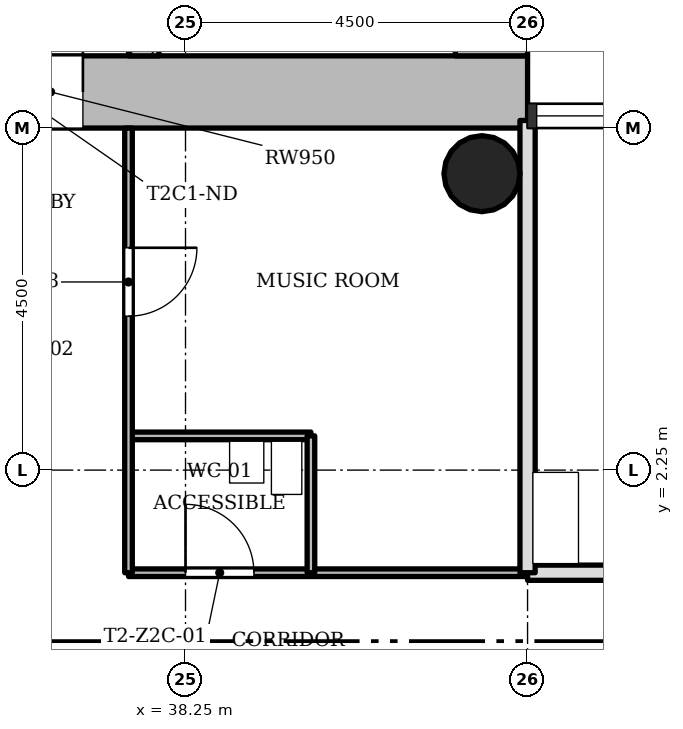
"""IFC4 building model, lengths in metres.
Left out: names, types, materials, properties, quantities, classifications, styles, units other than length and angle.
Written with IfcOpenShell. Run it as: python <this file> out.ifc"""

import sys

from ifc_helpers import new_model, si_unit, direction, frame, frame_2d, origin, origin_2d, place, context, subcontext, project, spatial, rectangle, hollow_circle, extrude, element, fill, save


model = new_model("IFC4")
c1 = context("Model", 3, precision=1e-05, world=origin(), true_north=direction((0.0, 1.0)))
c2 = subcontext(c1, "Body", "Model", "MODEL_VIEW")
j1 = project(units=[si_unit("LENGTHUNIT", "METRE"), si_unit("PLANEANGLEUNIT", "RADIAN")], contexts=[c1])
p1 = place(None, origin())
s1 = spatial("IfcSite", under=j1, at=p1, CompositionType="ELEMENT")
p2 = place(p1, origin())
s2 = spatial("IfcBuilding", under=s1, at=p2, CompositionType="ELEMENT")
p3 = place(p2, frame((0.0, 0.0, 86.8)))
s3 = spatial("IfcBuildingStorey", under=s2, at=p3, CompositionType="ELEMENT", Elevation=86.8)
p4 = place(p3, frame((30.2, 7.225, 0.0), z_axis=(0.0, 0.0, 1.0), x_axis=(1.0, 0.0, 0.0)))
e1 = element("IfcWall", 1, at=p4, inside=s3, PredefinedType="SHEAR", context=c2, shape_type="SweptSolid", body=[
    extrude(rectangle(XDim=12.55, YDim=0.95, at=frame_2d((6.275, 0.0))), origin(), (0.0, 0.0, 1.0), 3.4),
])
p5 = place(p4, frame((4.9, 0.0, 0.0)))
e2 = element("IfcOpeningElement", 2, at=p5, cuts=e1, PredefinedType="OPENING", context=c2, shape_type="SweptSolid", body=[
    extrude(rectangle(XDim=1.8, YDim=2.1, at=frame_2d((0.9, 1.05))), frame((0.0, 0.485, 0.0), z_axis=(0.0, -1.0, 0.0), x_axis=(1.0, 0.0, 0.0)), (0.0, 0.0, 1.0), 0.97),
])
p6 = place(p3, frame((42.275, 7.7, 0.0), z_axis=(0.0, 0.0, 1.0), x_axis=(0.0, 1.0, 0.0)))
e3 = element("IfcWall", 3, at=p6, inside=s3, PredefinedType="SHEAR", context=c2, shape_type="SweptSolid", body=[
    extrude(rectangle(XDim=8.05, YDim=0.95, at=frame_2d((4.025, 0.0))), origin(), (0.0, 0.0, 1.0), 3.4),
])
p7 = place(p3, frame((37.7, 7.7, 0.0), z_axis=(0.0, 0.0, 1.0), x_axis=(0.0, 1.0, 0.0)))
e4 = element("IfcWall", 4, at=p7, inside=s3, PredefinedType="SHEAR", context=c2, shape_type="SweptSolid", body=[
    extrude(rectangle(XDim=7.1, YDim=0.4, at=frame_2d((3.55, 0.0))), origin(), (0.0, 0.0, 1.0), 3.4),
])
p8 = place(p7, frame((0.8, 0.0, 0.0)))
e5 = element("IfcOpeningElement", 5, at=p8, cuts=e4, PredefinedType="OPENING", context=c2, shape_type="SweptSolid", body=[
    extrude(rectangle(XDim=1.1, YDim=2.1, at=frame_2d((0.55, 1.05))), frame((0.0, 0.21, 0.0), z_axis=(0.0, -1.0, 0.0), x_axis=(1.0, 0.0, 0.0)), (0.0, 0.0, 1.0), 0.42),
])
p9 = place(p7, frame((3.0, 0.0, 0.0)))
e6 = element("IfcOpeningElement", 6, at=p9, cuts=e4, PredefinedType="OPENING", context=c2, shape_type="SweptSolid", body=[
    extrude(rectangle(XDim=1.1, YDim=2.1, at=frame_2d((0.55, 1.05))), frame((0.0, 0.21, 0.0), z_axis=(0.0, -1.0, 0.0), x_axis=(1.0, 0.0, 0.0)), (0.0, 0.0, 1.0), 0.42),
])
p10 = place(p7, frame((5.2, 0.0, 0.0)))
e7 = element("IfcOpeningElement", 7, at=p10, cuts=e4, PredefinedType="OPENING", context=c2, shape_type="SweptSolid", body=[
    extrude(rectangle(XDim=1.1, YDim=2.1, at=frame_2d((0.55, 1.05))), frame((0.0, 0.21, 0.0), z_axis=(0.0, -1.0, 0.0), x_axis=(1.0, 0.0, 0.0)), (0.0, 0.0, 1.0), 0.42),
])
p11 = place(p3, frame((42.15, 6.15, 0.0), z_axis=(0.0, 0.0, 1.0), x_axis=(1.0, 0.0, 0.0)))
e8 = element("IfcColumn", 8, at=p11, inside=s3, PredefinedType="COLUMN", context=c2, shape_type="SweptSolid", body=[
    extrude(hollow_circle(Radius=0.5, WallThickness=0.036, at=origin_2d()), origin(), (0.0, 0.0, 1.0), 3.4),
])
p12 = place(p3, frame((42.75, 0.9, 0.0), z_axis=(0.0, 0.0, 1.0), x_axis=(-1.0, 0.0, 0.0)))
e9 = element("IfcWall", 9, at=p12, inside=s3, PredefinedType="PARTITIONING", context=c2, shape_type="SweptSolid", body=[
    extrude(rectangle(XDim=5.25, YDim=0.1, at=frame_2d((2.625, 0.0))), origin(), (0.0, 0.0, 1.0), 3.0),
])
p13 = place(p12, frame((3.6, 0.0, 0.0)))
e10 = element("IfcOpeningElement", 10, at=p13, cuts=e9, PredefinedType="OPENING", context=c2, shape_type="SweptSolid", body=[
    extrude(rectangle(XDim=0.9, YDim=2.1, at=frame_2d((0.45, 1.05))), frame((0.0, 0.06, 0.0), z_axis=(0.0, -1.0, 0.0), x_axis=(1.0, 0.0, 0.0)), (0.0, 0.0, 1.0), 0.12),
])
p14 = place(p3, frame((51.75, 0.9, 0.0), z_axis=(0.0, 0.0, 1.0), x_axis=(-1.0, 0.0, 0.0)))
e11 = element("IfcWall", 11, at=p14, inside=s3, PredefinedType="SOLIDWALL", context=c2, shape_type="SweptSolid", body=[
    extrude(rectangle(XDim=9.0, YDim=0.2, at=frame_2d((4.5, 0.0))), origin(), (0.0, 0.0, 1.0), 3.0),
])
p15 = place(p14, frame((1.95, 0.0, 0.0)))
e12 = element("IfcOpeningElement", 12, at=p15, cuts=e11, PredefinedType="OPENING", context=c2, shape_type="SweptSolid", body=[
    extrude(rectangle(XDim=0.9, YDim=2.1, at=frame_2d((0.45, 1.05))), frame((0.0, 0.11, 0.0), z_axis=(0.0, -1.0, 0.0), x_axis=(1.0, 0.0, 0.0)), (0.0, 0.0, 1.0), 0.22),
])
p16 = place(p3, frame((39.9, 2.7, 0.0), z_axis=(0.0, 0.0, 1.0), x_axis=(-1.0, 0.0, 0.0)))
e13 = element("IfcWall", 13, at=p16, inside=s3, PredefinedType="PARTITIONING", context=c2, shape_type="SweptSolid", body=[
    extrude(rectangle(XDim=2.4, YDim=0.1, at=frame_2d((1.2, 0.0))), origin(), (0.0, 0.0, 1.0), 3.0),
])
p17 = place(p3, frame((42.75, 0.9, 0.0), z_axis=(0.0, 0.0, 1.0), x_axis=(0.0, 1.0, 0.0)))
e14 = element("IfcWall", 14, at=p17, inside=s3, PredefinedType="SOLIDWALL", context=c2, shape_type="SweptSolid", body=[
    extrude(rectangle(XDim=5.95, YDim=0.2, at=frame_2d((2.975, 0.0))), origin(), (0.0, 0.0, 1.0), 3.0),
])
p18 = place(p3, frame((39.9, 0.9, 0.0), z_axis=(0.0, 0.0, 1.0), x_axis=(0.0, 1.0, 0.0)))
e15 = element("IfcWall", 15, at=p18, inside=s3, PredefinedType="PARTITIONING", context=c2, shape_type="SweptSolid", body=[
    extrude(rectangle(XDim=1.8, YDim=0.1, at=frame_2d((0.9, 0.0))), origin(), (0.0, 0.0, 1.0), 3.0),
])
p19 = place(p3, frame((37.5, 0.9, 0.0), z_axis=(0.0, 0.0, 1.0), x_axis=(0.0, 1.0, 0.0)))
e16 = element("IfcWall", 16, at=p19, inside=s3, PredefinedType="PARTITIONING", context=c2, shape_type="SweptSolid", body=[
    extrude(rectangle(XDim=5.85, YDim=0.1, at=frame_2d((2.925, 0.0))), origin(), (0.0, 0.0, 1.0), 3.0),
])
p20 = place(p19, frame((3.375, 0.0, 0.0)))
e17 = element("IfcOpeningElement", 17, at=p20, cuts=e16, PredefinedType="OPENING", context=c2, shape_type="SweptSolid", body=[
    extrude(rectangle(XDim=0.9, YDim=2.1, at=frame_2d((0.45, 1.05))), frame((0.0, 0.06, 0.0), z_axis=(0.0, -1.0, 0.0), x_axis=(1.0, 0.0, 0.0)), (0.0, 0.0, 1.0), 0.12),
])
p21 = place(p13, origin())
e18 = element("IfcDoor", 18, at=p21, inside=s3, OperationType="SINGLE_SWING_RIGHT", PredefinedType="DOOR", context=c2, shape_type="SweptSolid", body=[
    extrude(rectangle(XDim=0.9, YDim=2.1, at=frame_2d((0.45, 1.05))), frame((0.0, 0.025, 0.0), z_axis=(0.0, -1.0, 0.0), x_axis=(1.0, 0.0, 0.0)), (0.0, 0.0, 1.0), 0.05),
])
fill(e10, e18)
p22 = place(p20, origin())
e19 = element("IfcDoor", 19, at=p22, inside=s3, OperationType="SINGLE_SWING_RIGHT", PredefinedType="DOOR", context=c2, shape_type="SweptSolid", body=[
    extrude(rectangle(XDim=0.9, YDim=2.1, at=frame_2d((0.45, 1.05))), frame((0.0, 0.025, 0.0), z_axis=(0.0, -1.0, 0.0), x_axis=(1.0, 0.0, 0.0)), (0.0, 0.0, 1.0), 0.05),
])
fill(e17, e19)
p23 = place(p5, origin())
e20 = element("IfcDoor", 20, at=p23, inside=s3, OperationType="SINGLE_SWING_LEFT", PredefinedType="DOOR", context=c2, shape_type="SweptSolid", body=[
    extrude(rectangle(XDim=1.8, YDim=2.1, at=frame_2d((0.9, 1.05))), frame((0.0, 0.025, 0.0), z_axis=(0.0, -1.0, 0.0), x_axis=(1.0, 0.0, 0.0)), (0.0, 0.0, 1.0), 0.05),
])
fill(e2, e20)
save(model, sys.argv[1])
